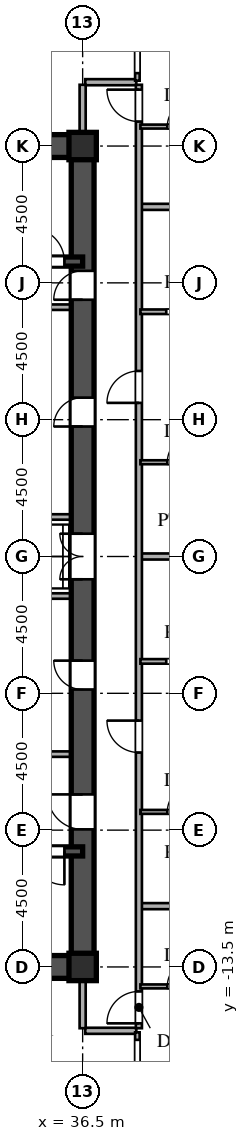
"""IFC4 building model, lengths in metres.
Left out: names, types, materials, properties, quantities, classifications, styles, units other than length and angle.
Written with IfcOpenShell. Run it as: python <this file> out.ifc"""

import sys

from ifc_helpers import new_model, si_unit, direction, frame, frame_2d, origin, origin_2d, place, context, subcontext, project, spatial, rectangle, i_section, extrude, source, transform, mapped, element, fill, save


model = new_model("IFC4")
c1 = context("Model", 3, precision=1e-05, world=origin(), true_north=direction((0.0, 1.0)))
c2 = subcontext(c1, "Body", "Model", "MODEL_VIEW")
j1 = project(units=[si_unit("LENGTHUNIT", "METRE"), si_unit("PLANEANGLEUNIT", "RADIAN")], contexts=[c1])
p1 = place(None, origin())
s1 = spatial("IfcSite", under=j1, at=p1, CompositionType="ELEMENT")
p2 = place(p1, origin())
s2 = spatial("IfcBuilding", under=s1, at=p2, CompositionType="ELEMENT")
p3 = place(p2, frame((0.0, 0.0, 40.5)))
s3 = spatial("IfcBuildingStorey", under=s2, at=p3, CompositionType="ELEMENT", Elevation=40.5)
m1 = source(origin(), c2, "Body", "SweptSolid", [
    extrude(i_section(OverallWidth=0.9, OverallDepth=0.9, WebThickness=0.036, FlangeThickness=0.055, at=origin_2d()), origin(), (0.0, 0.0, 1.0), 3.6),
])
for number, where, z_axis, x_axis in (
    (1, (36.5, -13.5, 0.0), (0.0, 0.0, 1.0), (1.0, 0.0, 0.0)),
    (2, (36.5, 13.5, 0.0), (0.0, 0.0, 1.0), (1.0, 0.0, 0.0)),
):
    element("IfcColumn", number, at=place(p3, frame(where, z_axis=z_axis, x_axis=x_axis)), inside=s3, PredefinedType="COLUMN", context=c2, shape_type="MappedRepresentation", body=[
        mapped(m1, transform((0.0, 0.0, 0.0), scale=1.0)),
    ])
for number, where, z_axis, x_axis in (
    (3, (27.5, -13.5, 0.0), (0.0, 0.0, 1.0), (1.0, 0.0, 0.0)),
    (4, (27.5, 13.5, 0.0), (0.0, 0.0, 1.0), (1.0, 0.0, 0.0)),
):
    element("IfcWall", number, at=place(p3, frame(where, z_axis=z_axis, x_axis=x_axis)), inside=s3, PredefinedType="SHEAR", context=c2, shape_type="SweptSolid", body=[
        extrude(rectangle(XDim=9.0, YDim=0.75, at=frame_2d((4.5, 0.0))), origin(), (0.0, 0.0, 1.0), 3.38),
    ])
p4 = place(p3, frame((36.5, -13.65, 0.0), z_axis=(0.0, 0.0, 1.0), x_axis=(0.0, 1.0, 0.0)))
e5 = element("IfcWall", 5, at=p4, inside=s3, PredefinedType="SHEAR", context=c2, shape_type="SweptSolid", body=[
    extrude(rectangle(XDim=7.15, YDim=0.75, at=frame_2d((3.575, 0.0))), origin(), (0.0, 0.0, 1.0), 3.38),
])
p5 = place(p4, frame((4.675, 0.0, 0.0)))
e6 = element("IfcOpeningElement", 6, at=p5, cuts=e5, PredefinedType="OPENING", context=c2, shape_type="SweptSolid", body=[
    extrude(rectangle(XDim=1.15, YDim=2.2, at=frame_2d((0.575, 1.1))), frame((0.0, 0.385, 0.0), z_axis=(0.0, -1.0, 0.0), x_axis=(1.0, 0.0, 0.0)), (0.0, 0.0, 1.0), 0.77),
])
p6 = place(p3, frame((36.5, -1.3, 0.0), z_axis=(0.0, 0.0, 1.0), x_axis=(0.0, 1.0, 0.0)))
e7 = element("IfcWall", 7, at=p6, inside=s3, PredefinedType="SHEAR", context=c2, shape_type="SweptSolid", body=[
    extrude(rectangle(XDim=2.6, YDim=0.75, at=frame_2d((1.3, 0.0))), origin(), (0.0, 0.0, 1.0), 3.38),
])
p7 = place(p6, frame((0.55, 0.0, 0.0)))
e8 = element("IfcOpeningElement", 8, at=p7, cuts=e7, PredefinedType="OPENING", context=c2, shape_type="SweptSolid", body=[
    extrude(rectangle(XDim=1.5, YDim=2.3, at=frame_2d((0.75, 1.15))), frame((0.0, 0.385, 0.0), z_axis=(0.0, -1.0, 0.0), x_axis=(1.0, 0.0, 0.0)), (0.0, 0.0, 1.0), 0.77),
])
p8 = place(p3, frame((36.5, 8.2, 0.0), z_axis=(0.0, 0.0, 1.0), x_axis=(0.0, 1.0, 0.0)))
e9 = element("IfcWall", 9, at=p8, inside=s3, PredefinedType="SHEAR", context=c2, shape_type="SweptSolid", body=[
    extrude(rectangle(XDim=5.45, YDim=0.75, at=frame_2d((2.725, 0.0))), origin(), (0.0, 0.0, 1.0), 3.38),
])
p9 = place(p8, frame((0.245, 0.0, 0.0)))
e10 = element("IfcOpeningElement", 10, at=p9, cuts=e9, PredefinedType="OPENING", context=c2, shape_type="SweptSolid", body=[
    extrude(rectangle(XDim=0.95, YDim=2.15, at=frame_2d((0.475, 1.075))), frame((0.0, 0.385, 0.0), z_axis=(0.0, -1.0, 0.0), x_axis=(1.0, 0.0, 0.0)), (0.0, 0.0, 1.0), 0.77),
])
p10 = place(p3, frame((36.5, -6.5, 0.0), z_axis=(0.0, 0.0, 1.0), x_axis=(0.0, 1.0, 0.0)))
e11 = element("IfcWall", 11, at=p10, inside=s3, PredefinedType="SHEAR", context=c2, shape_type="SweptSolid", body=[
    extrude(rectangle(XDim=5.2, YDim=0.75, at=frame_2d((2.6, 0.0))), origin(), (0.0, 0.0, 1.0), 3.38),
])
p11 = place(p10, frame((2.125, 0.0, 0.0)))
e12 = element("IfcOpeningElement", 12, at=p11, cuts=e11, PredefinedType="OPENING", context=c2, shape_type="SweptSolid", body=[
    extrude(rectangle(XDim=0.95, YDim=2.15, at=frame_2d((0.475, 1.075))), frame((0.0, 0.385, 0.0), z_axis=(0.0, -1.0, 0.0), x_axis=(1.0, 0.0, 0.0)), (0.0, 0.0, 1.0), 0.77),
])
p12 = place(p3, frame((36.5, 1.3, 0.0), z_axis=(0.0, 0.0, 1.0), x_axis=(0.0, 1.0, 0.0)))
e13 = element("IfcWall", 13, at=p12, inside=s3, PredefinedType="SHEAR", context=c2, shape_type="SweptSolid", body=[
    extrude(rectangle(XDim=6.9, YDim=0.75, at=frame_2d((3.45, 0.0))), origin(), (0.0, 0.0, 1.0), 3.38),
])
p13 = place(p12, frame((2.975, 0.0, 0.0)))
e14 = element("IfcOpeningElement", 14, at=p13, cuts=e13, PredefinedType="OPENING", context=c2, shape_type="SweptSolid", body=[
    extrude(rectangle(XDim=0.95, YDim=2.15, at=frame_2d((0.475, 1.075))), frame((0.0, 0.385, 0.0), z_axis=(0.0, -1.0, 0.0), x_axis=(1.0, 0.0, 0.0)), (0.0, 0.0, 1.0), 0.77),
])
p14 = place(p3, frame((27.5, -9.7, 0.0), z_axis=(0.0, 0.0, 1.0), x_axis=(1.0, 0.0, 0.0)))
e15 = element("IfcWall", 15, at=p14, inside=s3, PredefinedType="SHEAR", context=c2, shape_type="SweptSolid", body=[
    extrude(rectangle(XDim=9.0, YDim=0.3, at=frame_2d((4.5, 0.0))), origin(), (0.0, 0.0, 1.0), 3.38),
])
p15 = place(p14, frame((7.3, 0.0, 0.0)))
e16 = element("IfcOpeningElement", 16, at=p15, cuts=e15, PredefinedType="OPENING", context=c2, shape_type="SweptSolid", body=[
    extrude(rectangle(XDim=1.1, YDim=2.2, at=frame_2d((0.55, 1.1))), frame((0.0, 0.16, 0.0), z_axis=(0.0, -1.0, 0.0), x_axis=(1.0, 0.0, 0.0)), (0.0, 0.0, 1.0), 0.32),
])
p16 = place(p3, frame((27.5, 9.7, 0.0), z_axis=(0.0, 0.0, 1.0), x_axis=(1.0, 0.0, 0.0)))
e17 = element("IfcWall", 17, at=p16, inside=s3, PredefinedType="SHEAR", context=c2, shape_type="SweptSolid", body=[
    extrude(rectangle(XDim=9.0, YDim=0.3, at=frame_2d((4.5, 0.0))), origin(), (0.0, 0.0, 1.0), 3.38),
])
p17 = place(p16, frame((7.3, 0.0, 0.0)))
e18 = element("IfcOpeningElement", 18, at=p17, cuts=e17, PredefinedType="OPENING", context=c2, shape_type="SweptSolid", body=[
    extrude(rectangle(XDim=1.1, YDim=2.2, at=frame_2d((0.55, 1.1))), frame((0.0, 0.16, 0.0), z_axis=(0.0, -1.0, 0.0), x_axis=(1.0, 0.0, 0.0)), (0.0, 0.0, 1.0), 0.32),
])
for number, where, z_axis, x_axis in (
    (19, (30.45, -6.5, 0.0), (0.0, 0.0, 1.0), (1.0, 0.0, 0.0)),
    (20, (30.45, 8.2, 0.0), (0.0, 0.0, 1.0), (1.0, 0.0, 0.0)),
):
    element("IfcWall", number, at=place(p3, frame(where, z_axis=z_axis, x_axis=x_axis)), inside=s3, PredefinedType="PARTITIONING", context=c2, shape_type="SweptSolid", body=[
        extrude(rectangle(XDim=5.7, YDim=0.18, at=frame_2d((2.85, 0.0))), origin(), (0.0, 0.0, 1.0), 3.38),
    ])
for number, where, z_axis, x_axis in (
    (21, (33.2, -1.3, 0.0), (0.0, 0.0, 1.0), (1.0, 0.0, 0.0)),
    (22, (33.2, 1.3, 0.0), (0.0, 0.0, 1.0), (1.0, 0.0, 0.0)),
):
    element("IfcWall", number, at=place(p3, frame(where, z_axis=z_axis, x_axis=x_axis)), inside=s3, PredefinedType="PARTITIONING", context=c2, shape_type="SweptSolid", body=[
        extrude(rectangle(XDim=2.95, YDim=0.18, at=frame_2d((1.475, 0.0))), origin(), (0.0, 0.0, 1.0), 3.38),
    ])
p18 = place(p3, frame((36.585, -15.6, 0.0), z_axis=(0.0, 0.0, 1.0), x_axis=(1.0, 0.0, 0.0)))
e23 = element("IfcWall", 23, at=p18, inside=s3, PredefinedType="PARTITIONING", context=c2, shape_type="SweptSolid", body=[
    extrude(rectangle(XDim=1.68, YDim=0.2, at=frame_2d((0.84, 0.0))), origin(), (0.0, 0.0, 1.0), 3.38),
])
p19 = place(p3, frame((38.4, -14.14, 0.0), z_axis=(0.0, 0.0, 1.0), x_axis=(1.0, 0.0, 0.0)))
e24 = element("IfcWall", 24, at=p19, inside=s3, PredefinedType="PARTITIONING", context=c2, shape_type="SweptSolid", body=[
    extrude(rectangle(XDim=2.65, YDim=0.13, at=frame_2d((1.325, 0.0))), origin(), (0.0, 0.0, 1.0), 3.38),
])
p20 = place(p19, frame((0.885, 0.0, 0.0)))
e25 = element("IfcOpeningElement", 25, at=p20, cuts=e24, PredefinedType="OPENING", context=c2, shape_type="SweptSolid", body=[
    extrude(rectangle(XDim=0.88, YDim=2.1, at=frame_2d((0.44, 1.05))), frame((0.0, 0.075, 0.0), z_axis=(0.0, -1.0, 0.0), x_axis=(1.0, 0.0, 0.0)), (0.0, 0.0, 1.0), 0.15),
])
p21 = place(p3, frame((38.43, -11.5, 0.0), z_axis=(0.0, 0.0, 1.0), x_axis=(1.0, 0.0, 0.0)))
e26 = element("IfcWall", 26, at=p21, inside=s3, PredefinedType="PARTITIONING", context=c2, shape_type="SweptSolid", body=[
    extrude(rectangle(XDim=30.377, YDim=0.2, at=frame_2d((15.188, 0.0))), origin(), (0.0, 0.0, 1.0), 3.38),
])
p22 = place(p3, frame((38.4, -8.4, 0.0), z_axis=(0.0, 0.0, 1.0), x_axis=(1.0, 0.0, 0.0)))
e27 = element("IfcWall", 27, at=p22, inside=s3, PredefinedType="PARTITIONING", context=c2, shape_type="SweptSolid", body=[
    extrude(rectangle(XDim=2.65, YDim=0.13, at=frame_2d((1.325, 0.0))), origin(), (0.0, 0.0, 1.0), 3.38),
])
p23 = place(p22, frame((0.885, 0.0, 0.0)))
e28 = element("IfcOpeningElement", 28, at=p23, cuts=e27, PredefinedType="OPENING", context=c2, shape_type="SweptSolid", body=[
    extrude(rectangle(XDim=0.88, YDim=2.1, at=frame_2d((0.44, 1.05))), frame((0.0, 0.075, 0.0), z_axis=(0.0, -1.0, 0.0), x_axis=(1.0, 0.0, 0.0)), (0.0, 0.0, 1.0), 0.15),
])
p24 = place(p3, frame((38.4, -3.45, 0.0), z_axis=(0.0, 0.0, 1.0), x_axis=(1.0, 0.0, 0.0)))
e29 = element("IfcWall", 29, at=p24, inside=s3, PredefinedType="PARTITIONING", context=c2, shape_type="SweptSolid", body=[
    extrude(rectangle(XDim=2.65, YDim=0.15, at=frame_2d((1.325, 0.0))), origin(), (0.0, 0.0, 1.0), 3.38),
])
p25 = place(p24, frame((0.85, 0.0, 0.0)))
e30 = element("IfcOpeningElement", 30, at=p25, cuts=e29, PredefinedType="OPENING", context=c2, shape_type="SweptSolid", body=[
    extrude(rectangle(XDim=0.95, YDim=2.15, at=frame_2d((0.475, 1.075))), frame((0.0, 0.085, 0.0), z_axis=(0.0, -1.0, 0.0), x_axis=(1.0, 0.0, 0.0)), (0.0, 0.0, 1.0), 0.17),
])
p26 = place(p3, frame((38.43, 0.0, 0.0), z_axis=(0.0, 0.0, 1.0), x_axis=(1.0, 0.0, 0.0)))
e31 = element("IfcWall", 31, at=p26, inside=s3, PredefinedType="PARTITIONING", context=c2, shape_type="SweptSolid", body=[
    extrude(rectangle(XDim=25.05, YDim=0.2, at=frame_2d((12.525, 0.0))), origin(), (0.0, 0.0, 1.0), 3.38),
])
p27 = place(p3, frame((38.4, 3.1, 0.0), z_axis=(0.0, 0.0, 1.0), x_axis=(1.0, 0.0, 0.0)))
e32 = element("IfcWall", 32, at=p27, inside=s3, PredefinedType="PARTITIONING", context=c2, shape_type="SweptSolid", body=[
    extrude(rectangle(XDim=2.65, YDim=0.13, at=frame_2d((1.325, 0.0))), origin(), (0.0, 0.0, 1.0), 3.38),
])
p28 = place(p27, frame((0.885, 0.0, 0.0)))
e33 = element("IfcOpeningElement", 33, at=p28, cuts=e32, PredefinedType="OPENING", context=c2, shape_type="SweptSolid", body=[
    extrude(rectangle(XDim=0.88, YDim=2.1, at=frame_2d((0.44, 1.05))), frame((0.0, 0.075, 0.0), z_axis=(0.0, -1.0, 0.0), x_axis=(1.0, 0.0, 0.0)), (0.0, 0.0, 1.0), 0.15),
])
p29 = place(p3, frame((38.4, 8.05, 0.0), z_axis=(0.0, 0.0, 1.0), x_axis=(1.0, 0.0, 0.0)))
e34 = element("IfcWall", 34, at=p29, inside=s3, PredefinedType="PARTITIONING", context=c2, shape_type="SweptSolid", body=[
    extrude(rectangle(XDim=2.65, YDim=0.15, at=frame_2d((1.325, 0.0))), origin(), (0.0, 0.0, 1.0), 3.38),
])
p30 = place(p29, frame((0.85, 0.0, 0.0)))
e35 = element("IfcOpeningElement", 35, at=p30, cuts=e34, PredefinedType="OPENING", context=c2, shape_type="SweptSolid", body=[
    extrude(rectangle(XDim=0.95, YDim=2.15, at=frame_2d((0.475, 1.075))), frame((0.0, 0.085, 0.0), z_axis=(0.0, -1.0, 0.0), x_axis=(1.0, 0.0, 0.0)), (0.0, 0.0, 1.0), 0.17),
])
p31 = place(p3, frame((38.43, 11.5, 0.0), z_axis=(0.0, 0.0, 1.0), x_axis=(1.0, 0.0, 0.0)))
e36 = element("IfcWall", 36, at=p31, inside=s3, PredefinedType="PARTITIONING", context=c2, shape_type="SweptSolid", body=[
    extrude(rectangle(XDim=30.377, YDim=0.2, at=frame_2d((15.188, 0.0))), origin(), (0.0, 0.0, 1.0), 3.38),
])
p32 = place(p3, frame((38.4, 14.14, 0.0), z_axis=(0.0, 0.0, 1.0), x_axis=(1.0, 0.0, 0.0)))
e37 = element("IfcWall", 37, at=p32, inside=s3, PredefinedType="PARTITIONING", context=c2, shape_type="SweptSolid", body=[
    extrude(rectangle(XDim=2.65, YDim=0.13, at=frame_2d((1.325, 0.0))), origin(), (0.0, 0.0, 1.0), 3.38),
])
p33 = place(p32, frame((0.885, 0.0, 0.0)))
e38 = element("IfcOpeningElement", 38, at=p33, cuts=e37, PredefinedType="OPENING", context=c2, shape_type="SweptSolid", body=[
    extrude(rectangle(XDim=0.88, YDim=2.1, at=frame_2d((0.44, 1.05))), frame((0.0, 0.075, 0.0), z_axis=(0.0, -1.0, 0.0), x_axis=(1.0, 0.0, 0.0)), (0.0, 0.0, 1.0), 0.15),
])
p34 = place(p3, frame((36.585, 15.6, 0.0), z_axis=(0.0, 0.0, 1.0), x_axis=(1.0, 0.0, 0.0)))
e39 = element("IfcWall", 39, at=p34, inside=s3, PredefinedType="PARTITIONING", context=c2, shape_type="SweptSolid", body=[
    extrude(rectangle(XDim=1.68, YDim=0.2, at=frame_2d((0.84, 0.0))), origin(), (0.0, 0.0, 1.0), 3.38),
])
for number, where, z_axis, x_axis in (
    (40, (36.5, -15.515, 0.0), (0.0, 0.0, 1.0), (0.0, 1.0, 0.0)),
    (41, (36.5, 13.88, 0.0), (0.0, 0.0, 1.0), (0.0, 1.0, 0.0)),
):
    element("IfcWall", number, at=place(p3, frame(where, z_axis=z_axis, x_axis=x_axis)), inside=s3, PredefinedType="PARTITIONING", context=c2, shape_type="SweptSolid", body=[
        extrude(rectangle(XDim=1.635, YDim=0.2, at=frame_2d((0.817, 0.0))), origin(), (0.0, 0.0, 1.0), 2.68),
    ])
p35 = place(p3, frame((38.3, -23.878, 0.0), z_axis=(0.0, 0.0, 1.0), x_axis=(0.0, 1.0, 0.0)))
e42 = element("IfcWall", 42, at=p35, inside=s3, PredefinedType="PARTITIONING", context=c2, shape_type="SweptSolid", body=[
    extrude(rectangle(XDim=8.228, YDim=0.15, at=frame_2d((4.114, 0.0))), origin(), (0.0, 0.0, 1.0), 3.38),
])
p36 = place(p35, frame((7.031, 0.0, 0.0)))
e43 = element("IfcOpeningElement", 43, at=p36, cuts=e42, PredefinedType="OPENING", context=c2, shape_type="SweptSolid", body=[
    extrude(rectangle(XDim=0.95, YDim=2.15, at=frame_2d((0.475, 1.075))), frame((0.0, 0.085, 0.0), z_axis=(0.0, -1.0, 0.0), x_axis=(1.0, 0.0, 0.0)), (0.0, 0.0, 1.0), 0.17),
])
p37 = place(p3, frame((38.3, 15.65, 0.0), z_axis=(0.0, 0.0, 1.0), x_axis=(0.0, 1.0, 0.0)))
e44 = element("IfcWall", 44, at=p37, inside=s3, PredefinedType="PARTITIONING", context=c2, shape_type="SweptSolid", body=[
    extrude(rectangle(XDim=8.228, YDim=0.15, at=frame_2d((4.114, 0.0))), origin(), (0.0, 0.0, 1.0), 3.38),
])
p38 = place(p37, frame((0.248, 0.0, 0.0)))
e45 = element("IfcOpeningElement", 45, at=p38, cuts=e44, PredefinedType="OPENING", context=c2, shape_type="SweptSolid", body=[
    extrude(rectangle(XDim=0.95, YDim=2.15, at=frame_2d((0.475, 1.075))), frame((0.0, 0.085, 0.0), z_axis=(0.0, -1.0, 0.0), x_axis=(1.0, 0.0, 0.0)), (0.0, 0.0, 1.0), 0.17),
])
p39 = place(p3, frame((38.35, -15.515, 0.0), z_axis=(0.0, 0.0, 1.0), x_axis=(0.0, 1.0, 0.0)))
e46 = element("IfcWall", 46, at=p39, inside=s3, PredefinedType="PARTITIONING", context=c2, shape_type="SweptSolid", body=[
    extrude(rectangle(XDim=31.03, YDim=0.2, at=frame_2d((15.515, 0.0))), origin(), (0.0, 0.0, 1.0), 3.38),
])
p40 = place(p39, frame((0.16, 0.0, 0.0)))
e47 = element("IfcOpeningElement", 47, at=p40, cuts=e46, PredefinedType="OPENING", context=c2, shape_type="SweptSolid", body=[
    extrude(rectangle(XDim=1.05, YDim=2.25, at=frame_2d((0.525, 1.125))), frame((0.0, 0.11, 0.0), z_axis=(0.0, -1.0, 0.0), x_axis=(1.0, 0.0, 0.0)), (0.0, 0.0, 1.0), 0.22),
])
p41 = place(p39, frame((9.067, 0.0, 0.0)))
e48 = element("IfcOpeningElement", 48, at=p41, cuts=e46, PredefinedType="OPENING", context=c2, shape_type="SweptSolid", body=[
    extrude(rectangle(XDim=1.05, YDim=2.25, at=frame_2d((0.525, 1.125))), frame((0.0, 0.11, 0.0), z_axis=(0.0, -1.0, 0.0), x_axis=(1.0, 0.0, 0.0)), (0.0, 0.0, 1.0), 0.22),
])
p42 = place(p39, frame((20.567, 0.0, 0.0)))
e49 = element("IfcOpeningElement", 49, at=p42, cuts=e46, PredefinedType="OPENING", context=c2, shape_type="SweptSolid", body=[
    extrude(rectangle(XDim=1.05, YDim=2.25, at=frame_2d((0.525, 1.125))), frame((0.0, 0.11, 0.0), z_axis=(0.0, -1.0, 0.0), x_axis=(1.0, 0.0, 0.0)), (0.0, 0.0, 1.0), 0.22),
])
p43 = place(p39, frame((29.82, 0.0, 0.0)))
e50 = element("IfcOpeningElement", 50, at=p43, cuts=e46, PredefinedType="OPENING", context=c2, shape_type="SweptSolid", body=[
    extrude(rectangle(XDim=1.05, YDim=2.25, at=frame_2d((0.525, 1.125))), frame((0.0, 0.11, 0.0), z_axis=(0.0, -1.0, 0.0), x_axis=(1.0, 0.0, 0.0)), (0.0, 0.0, 1.0), 0.22),
])
m2 = source(origin(), c2, "Body", "SweptSolid", [
    extrude(rectangle(XDim=1.15, YDim=2.2, at=frame_2d((0.575, 1.1))), frame((0.0, 0.025, 0.0), z_axis=(0.0, -1.0, 0.0), x_axis=(1.0, 0.0, 0.0)), (0.0, 0.0, 1.0), 0.05),
])
p44 = place(p5, origin())
e51 = element("IfcDoor", 51, at=p44, inside=s3, OperationType="SINGLE_SWING_RIGHT", PredefinedType="DOOR", context=c2, shape_type="MappedRepresentation", body=[
    mapped(m2, transform((0.0, 0.0, 0.0), scale=1.0)),
])
fill(e6, e51)
m3 = source(origin(), c2, "Body", "SweptSolid", [
    extrude(rectangle(XDim=1.5, YDim=2.3, at=frame_2d((0.75, 1.15))), frame((0.0, 0.025, 0.0), z_axis=(0.0, -1.0, 0.0), x_axis=(1.0, 0.0, 0.0)), (0.0, 0.0, 1.0), 0.05),
])
p45 = place(p7, origin())
e52 = element("IfcDoor", 52, at=p45, inside=s3, OperationType="DOUBLE_SWING_LEFT", PredefinedType="DOOR", context=c2, shape_type="MappedRepresentation", body=[
    mapped(m3, transform((0.0, 0.0, 0.0), scale=1.0)),
])
fill(e8, e52)
m4 = source(origin(), c2, "Body", "SweptSolid", [
    extrude(rectangle(XDim=0.95, YDim=2.15, at=frame_2d((0.475, 1.075))), frame((0.0, 0.025, 0.0), z_axis=(0.0, -1.0, 0.0), x_axis=(1.0, 0.0, 0.0)), (0.0, 0.0, 1.0), 0.05),
])
p46 = place(p9, origin())
e53 = element("IfcDoor", 53, at=p46, inside=s3, OperationType="SINGLE_SWING_LEFT", PredefinedType="DOOR", context=c2, shape_type="MappedRepresentation", body=[
    mapped(m4, transform((0.0, 0.0, 0.0), scale=1.0)),
])
fill(e10, e53)
p47 = place(p11, origin())
e54 = element("IfcDoor", 54, at=p47, inside=s3, OperationType="SINGLE_SWING_RIGHT", PredefinedType="DOOR", context=c2, shape_type="MappedRepresentation", body=[
    mapped(m4, transform((0.0, 0.0, 0.0), scale=1.0)),
])
fill(e12, e54)
p48 = place(p13, origin())
e55 = element("IfcDoor", 55, at=p48, inside=s3, OperationType="SINGLE_SWING_LEFT", PredefinedType="DOOR", context=c2, shape_type="MappedRepresentation", body=[
    mapped(m4, transform((0.0, 0.0, 0.0), scale=1.0)),
])
fill(e14, e55)
m5 = source(origin(), c2, "Body", "SweptSolid", [
    extrude(rectangle(XDim=1.1, YDim=2.2, at=frame_2d((0.55, 1.1))), frame((0.0, 0.025, 0.0), z_axis=(0.0, -1.0, 0.0), x_axis=(1.0, 0.0, 0.0)), (0.0, 0.0, 1.0), 0.05),
])
p49 = place(p15, frame((1.1, 0.0, 0.0), z_axis=(0.0, 0.0, 1.0), x_axis=(-1.0, 0.0, 0.0)))
e56 = element("IfcDoor", 56, at=p49, inside=s3, OperationType="SINGLE_SWING_RIGHT", PredefinedType="DOOR", context=c2, shape_type="MappedRepresentation", body=[
    mapped(m5, transform((0.0, 0.0, 0.0), scale=1.0)),
])
fill(e16, e56)
p50 = place(p17, origin())
e57 = element("IfcDoor", 57, at=p50, inside=s3, OperationType="SINGLE_SWING_LEFT", PredefinedType="DOOR", context=c2, shape_type="MappedRepresentation", body=[
    mapped(m5, transform((0.0, 0.0, 0.0), scale=1.0)),
])
fill(e18, e57)
m6 = source(origin(), c2, "Body", "SweptSolid", [
    extrude(rectangle(XDim=0.88, YDim=2.1, at=frame_2d((0.44, 1.05))), frame((0.0, 0.025, 0.0), z_axis=(0.0, -1.0, 0.0), x_axis=(1.0, 0.0, 0.0)), (0.0, 0.0, 1.0), 0.05),
])
p51 = place(p20, origin())
e58 = element("IfcDoor", 58, at=p51, inside=s3, OperationType="SINGLE_SWING_RIGHT", PredefinedType="DOOR", context=c2, shape_type="MappedRepresentation", body=[
    mapped(m6, transform((0.0, 0.0, 0.0), scale=1.0)),
])
fill(e25, e58)
p52 = place(p23, origin())
e59 = element("IfcDoor", 59, at=p52, inside=s3, OperationType="SINGLE_SWING_RIGHT", PredefinedType="DOOR", context=c2, shape_type="MappedRepresentation", body=[
    mapped(m6, transform((0.0, 0.0, 0.0), scale=1.0)),
])
fill(e28, e59)
p53 = place(p28, origin())
e60 = element("IfcDoor", 60, at=p53, inside=s3, OperationType="SINGLE_SWING_RIGHT", PredefinedType="DOOR", context=c2, shape_type="MappedRepresentation", body=[
    mapped(m6, transform((0.0, 0.0, 0.0), scale=1.0)),
])
fill(e33, e60)
p54 = place(p33, origin())
e61 = element("IfcDoor", 61, at=p54, inside=s3, OperationType="SINGLE_SWING_RIGHT", PredefinedType="DOOR", context=c2, shape_type="MappedRepresentation", body=[
    mapped(m6, transform((0.0, 0.0, 0.0), scale=1.0)),
])
fill(e38, e61)
m7 = source(origin(), c2, "Body", "SweptSolid", [
    extrude(rectangle(XDim=1.05, YDim=2.25, at=frame_2d((0.525, 1.125))), frame((0.0, 0.025, 0.0), z_axis=(0.0, -1.0, 0.0), x_axis=(1.0, 0.0, 0.0)), (0.0, 0.0, 1.0), 0.05),
])
p55 = place(p40, origin())
e62 = element("IfcDoor", 62, at=p55, inside=s3, OperationType="SINGLE_SWING_LEFT", PredefinedType="DOOR", context=c2, shape_type="MappedRepresentation", body=[
    mapped(m7, transform((0.0, 0.0, 0.0), scale=1.0)),
])
fill(e47, e62)
p56 = place(p41, origin())
e63 = element("IfcDoor", 63, at=p56, inside=s3, OperationType="SINGLE_SWING_RIGHT", PredefinedType="DOOR", context=c2, shape_type="MappedRepresentation", body=[
    mapped(m7, transform((0.0, 0.0, 0.0), scale=1.0)),
])
fill(e48, e63)
p57 = place(p42, origin())
e64 = element("IfcDoor", 64, at=p57, inside=s3, OperationType="SINGLE_SWING_LEFT", PredefinedType="DOOR", context=c2, shape_type="MappedRepresentation", body=[
    mapped(m7, transform((0.0, 0.0, 0.0), scale=1.0)),
])
fill(e49, e64)
p58 = place(p43, origin())
e65 = element("IfcDoor", 65, at=p58, inside=s3, OperationType="SINGLE_SWING_RIGHT", PredefinedType="DOOR", context=c2, shape_type="MappedRepresentation", body=[
    mapped(m7, transform((0.0, 0.0, 0.0), scale=1.0)),
])
fill(e50, e65)
save(model, sys.argv[1])
